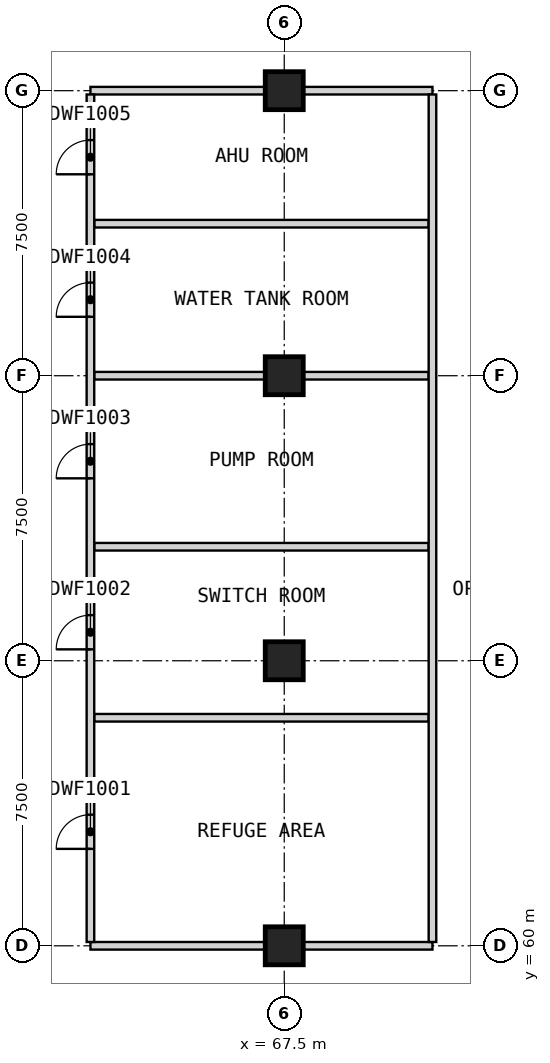
"""IFC4 building model, lengths in metres.
Left out: names, types, materials, properties, quantities, classifications, styles, units other than length and angle.
Written with IfcOpenShell. Run it as: python <this file> out.ifc"""

import sys

from ifc_helpers import new_model, si_unit, direction, frame, frame_2d, origin, origin_2d, place, context, subcontext, project, spatial, rectangle, extrude, element, fill, save


model = new_model("IFC4")
c1 = context("Model", 3, precision=1e-05, world=origin(), true_north=direction((0.0, 1.0)))
c2 = subcontext(c1, "Body", "Model", "MODEL_VIEW")
j1 = project(units=[si_unit("LENGTHUNIT", "METRE"), si_unit("PLANEANGLEUNIT", "RADIAN")], contexts=[c1])
p1 = place(None, origin())
s1 = spatial("IfcSite", under=j1, at=p1, CompositionType="ELEMENT")
p2 = place(p1, origin())
s2 = spatial("IfcBuilding", under=s1, at=p2, CompositionType="ELEMENT")
p3 = place(p2, frame((0.0, 0.0, 166.2)))
s3 = spatial("IfcBuildingStorey", under=s2, at=p3, CompositionType="ELEMENT", Elevation=166.2)
for number, where, z_axis, x_axis in (
    (1, (67.5, 60.0, 0.0), (0.0, 0.0, 1.0), (1.0, 0.0, 0.0)),
    (2, (67.5, 67.5, 0.0), (0.0, 0.0, 1.0), (1.0, 0.0, 0.0)),
    (3, (67.5, 75.0, 0.0), (0.0, 0.0, 1.0), (1.0, 0.0, 0.0)),
    (4, (67.5, 82.5, 0.0), (0.0, 0.0, 1.0), (1.0, 0.0, 0.0)),
):
    element("IfcColumn", number, at=place(p3, frame(where, z_axis=z_axis, x_axis=x_axis)), inside=s3, PredefinedType="COLUMN", context=c2, shape_type="SweptSolid", body=[
        extrude(rectangle(XDim=1.0, YDim=1.0, at=origin_2d()), origin(), (0.0, 0.0, 1.0), 8.0),
    ])
p4 = place(p3, frame((62.4, 60.0, 0.0), z_axis=(0.0, 0.0, 1.0), x_axis=(1.0, 0.0, 0.0)))
e5 = element("IfcWall", 5, at=p4, inside=s3, PredefinedType="PARTITIONING", context=c2, shape_type="SweptSolid", body=[
    extrude(rectangle(XDim=9.0, YDim=0.2, at=frame_2d((4.5, 0.0))), origin(), (0.0, 0.0, 1.0), 7.7),
])
for number, where, z_axis, x_axis in (
    (6, (62.5, 66.0, 0.0), (0.0, 0.0, 1.0), (1.0, 0.0, 0.0)),
    (7, (62.5, 70.5, 0.0), (0.0, 0.0, 1.0), (1.0, 0.0, 0.0)),
    (8, (62.5, 75.0, 0.0), (0.0, 0.0, 1.0), (1.0, 0.0, 0.0)),
    (9, (62.5, 79.0, 0.0), (0.0, 0.0, 1.0), (1.0, 0.0, 0.0)),
):
    element("IfcWall", number, at=place(p3, frame(where, z_axis=z_axis, x_axis=x_axis)), inside=s3, PredefinedType="PARTITIONING", context=c2, shape_type="SweptSolid", body=[
        extrude(rectangle(XDim=8.8, YDim=0.2, at=frame_2d((4.4, 0.0))), origin(), (0.0, 0.0, 1.0), 7.7),
    ])
p5 = place(p3, frame((62.4, 82.5, 0.0), z_axis=(0.0, 0.0, 1.0), x_axis=(1.0, 0.0, 0.0)))
e10 = element("IfcWall", 10, at=p5, inside=s3, PredefinedType="PARTITIONING", context=c2, shape_type="SweptSolid", body=[
    extrude(rectangle(XDim=9.0, YDim=0.2, at=frame_2d((4.5, 0.0))), origin(), (0.0, 0.0, 1.0), 7.7),
])
p6 = place(p3, frame((62.4, 60.1, 0.0), z_axis=(0.0, 0.0, 1.0), x_axis=(0.0, 1.0, 0.0)))
e11 = element("IfcWall", 11, at=p6, inside=s3, PredefinedType="PARTITIONING", context=c2, shape_type="SweptSolid", body=[
    extrude(rectangle(XDim=22.3, YDim=0.2, at=frame_2d((11.15, 0.0))), origin(), (0.0, 0.0, 1.0), 7.7),
])
p7 = place(p6, frame((2.45, 0.0, 0.0)))
e12 = element("IfcOpeningElement", 12, at=p7, cuts=e11, PredefinedType="OPENING", context=c2, shape_type="SweptSolid", body=[
    extrude(rectangle(XDim=0.9, YDim=2.1, at=frame_2d((0.45, 1.05))), frame((0.0, 0.11, 0.0), z_axis=(0.0, -1.0, 0.0), x_axis=(1.0, 0.0, 0.0)), (0.0, 0.0, 1.0), 0.22),
])
p8 = place(p6, frame((7.7, 0.0, 0.0)))
e13 = element("IfcOpeningElement", 13, at=p8, cuts=e11, PredefinedType="OPENING", context=c2, shape_type="SweptSolid", body=[
    extrude(rectangle(XDim=0.9, YDim=2.1, at=frame_2d((0.45, 1.05))), frame((0.0, 0.11, 0.0), z_axis=(0.0, -1.0, 0.0), x_axis=(1.0, 0.0, 0.0)), (0.0, 0.0, 1.0), 0.22),
])
p9 = place(p6, frame((12.2, 0.0, 0.0)))
e14 = element("IfcOpeningElement", 14, at=p9, cuts=e11, PredefinedType="OPENING", context=c2, shape_type="SweptSolid", body=[
    extrude(rectangle(XDim=0.9, YDim=2.1, at=frame_2d((0.45, 1.05))), frame((0.0, 0.11, 0.0), z_axis=(0.0, -1.0, 0.0), x_axis=(1.0, 0.0, 0.0)), (0.0, 0.0, 1.0), 0.22),
])
p10 = place(p6, frame((16.45, 0.0, 0.0)))
e15 = element("IfcOpeningElement", 15, at=p10, cuts=e11, PredefinedType="OPENING", context=c2, shape_type="SweptSolid", body=[
    extrude(rectangle(XDim=0.9, YDim=2.1, at=frame_2d((0.45, 1.05))), frame((0.0, 0.11, 0.0), z_axis=(0.0, -1.0, 0.0), x_axis=(1.0, 0.0, 0.0)), (0.0, 0.0, 1.0), 0.22),
])
p11 = place(p6, frame((20.2, 0.0, 0.0)))
e16 = element("IfcOpeningElement", 16, at=p11, cuts=e11, PredefinedType="OPENING", context=c2, shape_type="SweptSolid", body=[
    extrude(rectangle(XDim=0.9, YDim=2.1, at=frame_2d((0.45, 1.05))), frame((0.0, 0.11, 0.0), z_axis=(0.0, -1.0, 0.0), x_axis=(1.0, 0.0, 0.0)), (0.0, 0.0, 1.0), 0.22),
])
p12 = place(p3, frame((71.4, 60.1, 0.0), z_axis=(0.0, 0.0, 1.0), x_axis=(0.0, 1.0, 0.0)))
e17 = element("IfcWall", 17, at=p12, inside=s3, PredefinedType="PARTITIONING", context=c2, shape_type="SweptSolid", body=[
    extrude(rectangle(XDim=22.3, YDim=0.2, at=frame_2d((11.15, 0.0))), origin(), (0.0, 0.0, 1.0), 7.7),
])
p13 = place(p7, origin())
e18 = element("IfcDoor", 18, at=p13, inside=s3, OperationType="SINGLE_SWING_RIGHT", PredefinedType="DOOR", context=c2, shape_type="SweptSolid", body=[
    extrude(rectangle(XDim=0.9, YDim=2.1, at=frame_2d((0.45, 1.05))), frame((0.0, 0.025, 0.0), z_axis=(0.0, -1.0, 0.0), x_axis=(1.0, 0.0, 0.0)), (0.0, 0.0, 1.0), 0.05),
])
fill(e12, e18)
p14 = place(p8, origin())
e19 = element("IfcDoor", 19, at=p14, inside=s3, OperationType="SINGLE_SWING_RIGHT", PredefinedType="DOOR", context=c2, shape_type="SweptSolid", body=[
    extrude(rectangle(XDim=0.9, YDim=2.1, at=frame_2d((0.45, 1.05))), frame((0.0, 0.025, 0.0), z_axis=(0.0, -1.0, 0.0), x_axis=(1.0, 0.0, 0.0)), (0.0, 0.0, 1.0), 0.05),
])
fill(e13, e19)
p15 = place(p9, origin())
e20 = element("IfcDoor", 20, at=p15, inside=s3, OperationType="SINGLE_SWING_RIGHT", PredefinedType="DOOR", context=c2, shape_type="SweptSolid", body=[
    extrude(rectangle(XDim=0.9, YDim=2.1, at=frame_2d((0.45, 1.05))), frame((0.0, 0.025, 0.0), z_axis=(0.0, -1.0, 0.0), x_axis=(1.0, 0.0, 0.0)), (0.0, 0.0, 1.0), 0.05),
])
fill(e14, e20)
p16 = place(p10, origin())
e21 = element("IfcDoor", 21, at=p16, inside=s3, OperationType="SINGLE_SWING_RIGHT", PredefinedType="DOOR", context=c2, shape_type="SweptSolid", body=[
    extrude(rectangle(XDim=0.9, YDim=2.1, at=frame_2d((0.45, 1.05))), frame((0.0, 0.025, 0.0), z_axis=(0.0, -1.0, 0.0), x_axis=(1.0, 0.0, 0.0)), (0.0, 0.0, 1.0), 0.05),
])
fill(e15, e21)
p17 = place(p11, origin())
e22 = element("IfcDoor", 22, at=p17, inside=s3, OperationType="SINGLE_SWING_RIGHT", PredefinedType="DOOR", context=c2, shape_type="SweptSolid", body=[
    extrude(rectangle(XDim=0.9, YDim=2.1, at=frame_2d((0.45, 1.05))), frame((0.0, 0.025, 0.0), z_axis=(0.0, -1.0, 0.0), x_axis=(1.0, 0.0, 0.0)), (0.0, 0.0, 1.0), 0.05),
])
fill(e16, e22)
save(model, sys.argv[1])
